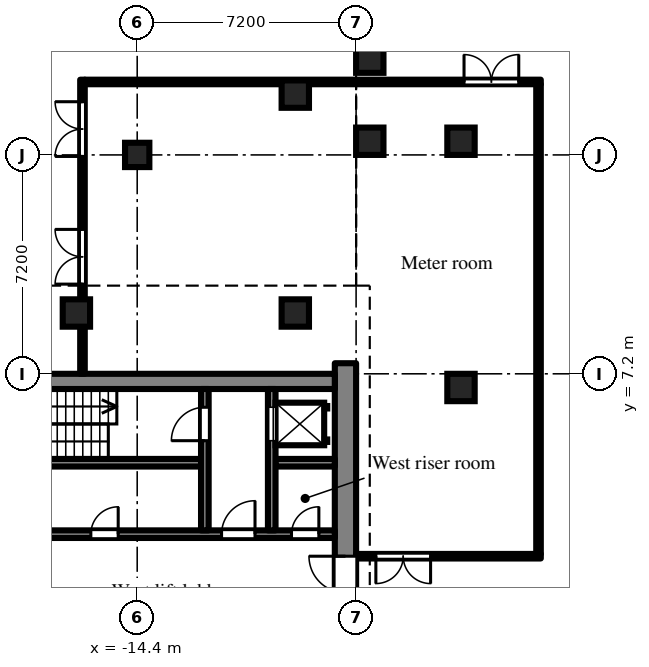
"""IFC4 building model, lengths in metres.
Left out: names, types, materials, properties, quantities, classifications, styles, units other than length and angle.
Written with IfcOpenShell. Run it as: python <this file> out.ifc"""

import sys

from ifc_helpers import new_model, si_unit, direction, frame, frame_2d, origin, origin_2d, place, context, subcontext, project, spatial, rectangle, extrude, element, fill, save


model = new_model("IFC4")
c1 = context("Model", 3, precision=1e-05, world=origin(), true_north=direction((0.0, 1.0)))
c2 = subcontext(c1, "Body", "Model", "MODEL_VIEW")
j1 = project(units=[si_unit("LENGTHUNIT", "METRE"), si_unit("PLANEANGLEUNIT", "RADIAN")], contexts=[c1])
p1 = place(None, origin())
s1 = spatial("IfcSite", under=j1, at=p1, CompositionType="ELEMENT")
p2 = place(p1, origin())
s2 = spatial("IfcBuilding", under=s1, at=p2, CompositionType="ELEMENT")
p3 = place(p2, frame((0.0, 0.0, -4.8)))
s3 = spatial("IfcBuildingStorey", under=s2, at=p3, CompositionType="ELEMENT", Elevation=-4.8)
for number, where, z_axis, x_axis in (
    (1, (-6.75, 14.85, -0.5), (0.0, 0.0, 1.0), (1.0, 0.0, 0.0)),
    (2, (-6.75, 17.55, -0.5), (0.0, 0.0, 1.0), (1.0, 0.0, 0.0)),
    (3, (-3.75, 6.75, -0.5), (0.0, 0.0, 1.0), (1.0, 0.0, 0.0)),
    (4, (-3.75, 14.85, -0.5), (0.0, 0.0, 1.0), (1.0, 0.0, 0.0)),
):
    element("IfcColumn", number, at=place(p3, frame(where, z_axis=z_axis, x_axis=x_axis)), inside=s3, PredefinedType="COLUMN", context=c2, shape_type="SweptSolid", body=[
        extrude(rectangle(XDim=0.9, YDim=0.9, at=origin_2d()), origin(), (0.0, 0.0, 1.0), 5.3),
    ])
p4 = place(p3, frame((-14.4, 14.4, -0.5), z_axis=(0.0, 0.0, 1.0), x_axis=(1.0, 0.0, 0.0)))
e5 = element("IfcColumn", 5, at=p4, inside=s3, PredefinedType="COLUMN", context=c2, shape_type="SweptSolid", body=[
    extrude(rectangle(XDim=0.8, YDim=0.8, at=origin_2d()), origin(), (0.0, 0.0, 1.0), 5.3),
])
for number, where, z_axis, x_axis in (
    (6, (-16.4, 9.2, -0.5), (0.0, 0.0, 1.0), (1.0, 0.0, 0.0)),
    (7, (-9.2, 9.2, -0.5), (0.0, 0.0, 1.0), (1.0, 0.0, 0.0)),
    (8, (-9.2, 16.4, -0.5), (0.0, 0.0, 1.0), (1.0, 0.0, 0.0)),
):
    element("IfcColumn", number, at=place(p3, frame(where, z_axis=z_axis, x_axis=x_axis)), inside=s3, PredefinedType="COLUMN", context=c2, shape_type="SweptSolid", body=[
        extrude(rectangle(XDim=0.9, YDim=0.9, at=origin_2d()), origin(), (0.0, 0.0, 1.0), 5.3),
    ])
p5 = place(p3, frame((-7.55, -7.548, 0.0), z_axis=(0.0, 0.0, 1.0), x_axis=(0.0, 1.0, 0.0)))
e9 = element("IfcWall", 9, at=p5, inside=s3, PredefinedType="SHEAR", context=c2, shape_type="SweptSolid", body=[
    extrude(rectangle(XDim=15.096, YDim=0.7, at=frame_2d((7.548, 0.0))), origin(), (0.0, 0.0, 1.0), 4.35),
])
p6 = place(p5, frame((6.348, 0.0, 0.0)))
e10 = element("IfcOpeningElement", 10, at=p6, cuts=e9, PredefinedType="OPENING", context=c2, shape_type="SweptSolid", body=[
    extrude(rectangle(XDim=2.4, YDim=2.2, at=frame_2d((1.2, 1.1))), frame((0.0, 0.36, 0.0), z_axis=(0.0, -1.0, 0.0), x_axis=(1.0, 0.0, 0.0)), (0.0, 0.0, 1.0), 0.72),
])
p7 = place(p3, frame((-7.9, 6.95, 0.0), z_axis=(0.0, 0.0, 1.0), x_axis=(-1.0, 0.0, 0.0)))
e11 = element("IfcWall", 11, at=p7, inside=s3, PredefinedType="SHEAR", context=c2, shape_type="SweptSolid", body=[
    extrude(rectangle(XDim=12.95, YDim=0.5, at=frame_2d((6.475, 0.0))), origin(), (0.0, 0.0, 1.0), 4.35),
])
p8 = place(p3, frame((-7.9, 1.925, 0.0), z_axis=(0.0, 0.0, 1.0), x_axis=(-1.0, 0.0, 0.0)))
e12 = element("IfcWall", 12, at=p8, inside=s3, PredefinedType="SHEAR", context=c2, shape_type="SweptSolid", body=[
    extrude(rectangle(XDim=12.95, YDim=0.25, at=frame_2d((6.475, 0.0))), origin(), (0.0, 0.0, 1.0), 4.35),
])
p9 = place(p8, frame((0.525, 0.0, 0.0)))
e13 = element("IfcOpeningElement", 13, at=p9, cuts=e12, PredefinedType="OPENING", context=c2, shape_type="SweptSolid", body=[
    extrude(rectangle(XDim=0.9, YDim=2.1, at=frame_2d((0.45, 1.05))), frame((0.0, 0.135, 0.0), z_axis=(0.0, -1.0, 0.0), x_axis=(1.0, 0.0, 0.0)), (0.0, 0.0, 1.0), 0.27),
])
p10 = place(p8, frame((2.625, 0.0, 0.0)))
e14 = element("IfcOpeningElement", 14, at=p10, cuts=e12, PredefinedType="OPENING", context=c2, shape_type="SweptSolid", body=[
    extrude(rectangle(XDim=1.1, YDim=2.1, at=frame_2d((0.55, 1.05))), frame((0.0, 0.135, 0.0), z_axis=(0.0, -1.0, 0.0), x_axis=(1.0, 0.0, 0.0)), (0.0, 0.0, 1.0), 0.27),
])
p11 = place(p8, frame((7.125, 0.0, 0.0)))
e15 = element("IfcOpeningElement", 15, at=p11, cuts=e12, PredefinedType="OPENING", context=c2, shape_type="SweptSolid", body=[
    extrude(rectangle(XDim=0.9, YDim=2.1, at=frame_2d((0.45, 1.05))), frame((0.0, 0.135, 0.0), z_axis=(0.0, -1.0, 0.0), x_axis=(1.0, 0.0, 0.0)), (0.0, 0.0, 1.0), 0.27),
])
p12 = place(p3, frame((-7.9, 4.275, 0.0), z_axis=(0.0, 0.0, 1.0), x_axis=(-1.0, 0.0, 0.0)))
e16 = element("IfcWall", 16, at=p12, inside=s3, PredefinedType="SHEAR", context=c2, shape_type="SweptSolid", body=[
    extrude(rectangle(XDim=1.95, YDim=0.25, at=frame_2d((0.975, 0.0))), origin(), (0.0, 0.0, 1.0), 4.35),
])
p13 = place(p3, frame((-12.3, 4.275, 0.0), z_axis=(0.0, 0.0, 1.0), x_axis=(-1.0, 0.0, 0.0)))
e17 = element("IfcWall", 17, at=p13, inside=s3, PredefinedType="SHEAR", context=c2, shape_type="SweptSolid", body=[
    extrude(rectangle(XDim=8.55, YDim=0.25, at=frame_2d((4.275, 0.0))), origin(), (0.0, 0.0, 1.0), 4.35),
])
p14 = place(p3, frame((-9.975, 2.05, 0.0), z_axis=(0.0, 0.0, 1.0), x_axis=(0.0, 1.0, 0.0)))
e18 = element("IfcWall", 18, at=p14, inside=s3, PredefinedType="SHEAR", context=c2, shape_type="SweptSolid", body=[
    extrude(rectangle(XDim=4.65, YDim=0.25, at=frame_2d((2.325, 0.0))), origin(), (0.0, 0.0, 1.0), 4.35),
])
p15 = place(p14, frame((2.95, 0.0, 0.0)))
e19 = element("IfcOpeningElement", 19, at=p15, cuts=e18, PredefinedType="OPENING", context=c2, shape_type="SweptSolid", body=[
    extrude(rectangle(XDim=1.1, YDim=2.1, at=frame_2d((0.55, 1.05))), frame((0.0, 0.135, 0.0), z_axis=(0.0, -1.0, 0.0), x_axis=(1.0, 0.0, 0.0)), (0.0, 0.0, 1.0), 0.27),
])
p16 = place(p3, frame((-12.175, 2.05, 0.0), z_axis=(0.0, 0.0, 1.0), x_axis=(0.0, 1.0, 0.0)))
e20 = element("IfcWall", 20, at=p16, inside=s3, PredefinedType="SHEAR", context=c2, shape_type="SweptSolid", body=[
    extrude(rectangle(XDim=4.65, YDim=0.25, at=frame_2d((2.325, 0.0))), origin(), (0.0, 0.0, 1.0), 4.35),
])
p17 = place(p16, frame((2.95, 0.0, 0.0)))
e21 = element("IfcOpeningElement", 21, at=p17, cuts=e20, PredefinedType="OPENING", context=c2, shape_type="SweptSolid", body=[
    extrude(rectangle(XDim=1.1, YDim=2.1, at=frame_2d((0.55, 1.05))), frame((0.0, 0.135, 0.0), z_axis=(0.0, -1.0, 0.0), x_axis=(1.0, 0.0, 0.0)), (0.0, 0.0, 1.0), 0.27),
])
p18 = place(p3, frame((-16.2, 7.2, 0.0), z_axis=(0.0, 0.0, 1.0), x_axis=(0.0, 1.0, 0.0)))
e22 = element("IfcWall", 22, at=p18, inside=s3, PredefinedType="PARTITIONING", context=c2, shape_type="SweptSolid", body=[
    extrude(rectangle(XDim=9.675, YDim=0.15, at=frame_2d((4.837, 0.0))), origin(), (0.0, 0.0, 1.0), 4.35),
])
p19 = place(p18, frame((2.95, 0.0, 0.0)))
e23 = element("IfcOpeningElement", 23, at=p19, cuts=e22, PredefinedType="OPENING", context=c2, shape_type="SweptSolid", body=[
    extrude(rectangle(XDim=1.8, YDim=2.1, at=frame_2d((0.9, 1.05))), frame((0.0, 0.085, 0.0), z_axis=(0.0, -1.0, 0.0), x_axis=(1.0, 0.0, 0.0)), (0.0, 0.0, 1.0), 0.17),
])
p20 = place(p18, frame((7.15, 0.0, 0.0)))
e24 = element("IfcOpeningElement", 24, at=p20, cuts=e22, PredefinedType="OPENING", context=c2, shape_type="SweptSolid", body=[
    extrude(rectangle(XDim=1.8, YDim=2.1, at=frame_2d((0.9, 1.05))), frame((0.0, 0.085, 0.0), z_axis=(0.0, -1.0, 0.0), x_axis=(1.0, 0.0, 0.0)), (0.0, 0.0, 1.0), 0.17),
])
p21 = place(p3, frame((-16.125, 16.8, 0.0), z_axis=(0.0, 0.0, 1.0), x_axis=(1.0, 0.0, 0.0)))
e25 = element("IfcWall", 25, at=p21, inside=s3, PredefinedType="PARTITIONING", context=c2, shape_type="SweptSolid", body=[
    extrude(rectangle(XDim=15.0, YDim=0.15, at=frame_2d((7.5, 0.0))), origin(), (0.0, 0.0, 1.0), 4.35),
])
p22 = place(p21, frame((12.475, 0.0, 0.0)))
e26 = element("IfcOpeningElement", 26, at=p22, cuts=e25, PredefinedType="OPENING", context=c2, shape_type="SweptSolid", body=[
    extrude(rectangle(XDim=1.8, YDim=2.1, at=frame_2d((0.9, 1.05))), frame((0.0, 0.085, 0.0), z_axis=(0.0, -1.0, 0.0), x_axis=(1.0, 0.0, 0.0)), (0.0, 0.0, 1.0), 0.17),
])
p23 = place(p3, frame((-7.2, 1.2, 0.0), z_axis=(0.0, 0.0, 1.0), x_axis=(1.0, 0.0, 0.0)))
e27 = element("IfcWall", 27, at=p23, inside=s3, PredefinedType="PARTITIONING", context=c2, shape_type="SweptSolid", body=[
    extrude(rectangle(XDim=6.075, YDim=0.15, at=frame_2d((3.038, 0.0))), origin(), (0.0, 0.0, 1.0), 4.35),
])
p24 = place(p23, frame((0.65, 0.0, 0.0)))
e28 = element("IfcOpeningElement", 28, at=p24, cuts=e27, PredefinedType="OPENING", context=c2, shape_type="SweptSolid", body=[
    extrude(rectangle(XDim=1.8, YDim=2.1, at=frame_2d((0.9, 1.05))), frame((0.0, 0.085, 0.0), z_axis=(0.0, -1.0, 0.0), x_axis=(1.0, 0.0, 0.0)), (0.0, 0.0, 1.0), 0.17),
])
p25 = place(p3, frame((-1.2, 1.275, 0.0), z_axis=(0.0, 0.0, 1.0), x_axis=(0.0, 1.0, 0.0)))
e29 = element("IfcWall", 29, at=p25, inside=s3, PredefinedType="PARTITIONING", context=c2, shape_type="SweptSolid", body=[
    extrude(rectangle(XDim=15.45, YDim=0.15, at=frame_2d((7.725, 0.0))), origin(), (0.0, 0.0, 1.0), 4.35),
])
p26 = place(p15, origin())
e30 = element("IfcDoor", 30, at=p26, inside=s3, OperationType="SLIDING_TO_LEFT", PredefinedType="DOOR", context=c2, shape_type="SweptSolid", body=[
    extrude(rectangle(XDim=1.1, YDim=2.1, at=frame_2d((0.55, 1.05))), frame((0.0, 0.025, 0.0), z_axis=(0.0, -1.0, 0.0), x_axis=(1.0, 0.0, 0.0)), (0.0, 0.0, 1.0), 0.05),
])
fill(e19, e30)
p27 = place(p17, origin())
e31 = element("IfcDoor", 31, at=p27, inside=s3, OperationType="SINGLE_SWING_LEFT", PredefinedType="DOOR", context=c2, shape_type="SweptSolid", body=[
    extrude(rectangle(XDim=1.1, YDim=2.1, at=frame_2d((0.55, 1.05))), frame((0.0, 0.025, 0.0), z_axis=(0.0, -1.0, 0.0), x_axis=(1.0, 0.0, 0.0)), (0.0, 0.0, 1.0), 0.05),
])
fill(e21, e31)
p28 = place(p9, frame((0.9, 0.0, 0.0), z_axis=(0.0, 0.0, 1.0), x_axis=(-1.0, 0.0, 0.0)))
e32 = element("IfcDoor", 32, at=p28, inside=s3, OperationType="SINGLE_SWING_RIGHT", PredefinedType="DOOR", context=c2, shape_type="SweptSolid", body=[
    extrude(rectangle(XDim=0.9, YDim=2.1, at=frame_2d((0.45, 1.05))), frame((0.0, 0.025, 0.0), z_axis=(0.0, -1.0, 0.0), x_axis=(1.0, 0.0, 0.0)), (0.0, 0.0, 1.0), 0.05),
])
fill(e13, e32)
p29 = place(p10, frame((1.1, 0.0, 0.0), z_axis=(0.0, 0.0, 1.0), x_axis=(-1.0, 0.0, 0.0)))
e33 = element("IfcDoor", 33, at=p29, inside=s3, OperationType="SINGLE_SWING_RIGHT", PredefinedType="DOOR", context=c2, shape_type="SweptSolid", body=[
    extrude(rectangle(XDim=1.1, YDim=2.1, at=frame_2d((0.55, 1.05))), frame((0.0, 0.025, 0.0), z_axis=(0.0, -1.0, 0.0), x_axis=(1.0, 0.0, 0.0)), (0.0, 0.0, 1.0), 0.05),
])
fill(e14, e33)
p30 = place(p6, origin())
e34 = element("IfcDoor", 34, at=p30, inside=s3, OperationType="DOUBLE_DOOR_DOUBLE_SWING", PredefinedType="DOOR", context=c2, shape_type="SweptSolid", body=[
    extrude(rectangle(XDim=2.4, YDim=2.2, at=frame_2d((1.2, 1.1))), frame((0.0, 0.025, 0.0), z_axis=(0.0, -1.0, 0.0), x_axis=(1.0, 0.0, 0.0)), (0.0, 0.0, 1.0), 0.05),
])
fill(e10, e34)
p31 = place(p11, frame((0.9, 0.0, 0.0), z_axis=(0.0, 0.0, 1.0), x_axis=(-1.0, 0.0, 0.0)))
e35 = element("IfcDoor", 35, at=p31, inside=s3, OperationType="SINGLE_SWING_RIGHT", PredefinedType="DOOR", context=c2, shape_type="SweptSolid", body=[
    extrude(rectangle(XDim=0.9, YDim=2.1, at=frame_2d((0.45, 1.05))), frame((0.0, 0.025, 0.0), z_axis=(0.0, -1.0, 0.0), x_axis=(1.0, 0.0, 0.0)), (0.0, 0.0, 1.0), 0.05),
])
fill(e15, e35)
p32 = place(p19, origin())
e36 = element("IfcDoor", 36, at=p32, inside=s3, OperationType="DOUBLE_DOOR_DOUBLE_SWING", PredefinedType="DOOR", context=c2, shape_type="SweptSolid", body=[
    extrude(rectangle(XDim=1.8, YDim=2.1, at=frame_2d((0.9, 1.05))), frame((0.0, 0.025, 0.0), z_axis=(0.0, -1.0, 0.0), x_axis=(1.0, 0.0, 0.0)), (0.0, 0.0, 1.0), 0.05),
])
fill(e23, e36)
p33 = place(p20, origin())
e37 = element("IfcDoor", 37, at=p33, inside=s3, OperationType="DOUBLE_DOOR_DOUBLE_SWING", PredefinedType="DOOR", context=c2, shape_type="SweptSolid", body=[
    extrude(rectangle(XDim=1.8, YDim=2.1, at=frame_2d((0.9, 1.05))), frame((0.0, 0.025, 0.0), z_axis=(0.0, -1.0, 0.0), x_axis=(1.0, 0.0, 0.0)), (0.0, 0.0, 1.0), 0.05),
])
fill(e24, e37)
p34 = place(p24, frame((1.8, 0.0, 0.0), z_axis=(0.0, 0.0, 1.0), x_axis=(-1.0, 0.0, 0.0)))
e38 = element("IfcDoor", 38, at=p34, inside=s3, OperationType="DOUBLE_DOOR_DOUBLE_SWING", PredefinedType="DOOR", context=c2, shape_type="SweptSolid", body=[
    extrude(rectangle(XDim=1.8, YDim=2.1, at=frame_2d((0.9, 1.05))), frame((0.0, 0.025, 0.0), z_axis=(0.0, -1.0, 0.0), x_axis=(1.0, 0.0, 0.0)), (0.0, 0.0, 1.0), 0.05),
])
fill(e28, e38)
p35 = place(p22, origin())
e39 = element("IfcDoor", 39, at=p35, inside=s3, OperationType="DOUBLE_DOOR_DOUBLE_SWING", PredefinedType="DOOR", context=c2, shape_type="SweptSolid", body=[
    extrude(rectangle(XDim=1.8, YDim=2.1, at=frame_2d((0.9, 1.05))), frame((0.0, 0.025, 0.0), z_axis=(0.0, -1.0, 0.0), x_axis=(1.0, 0.0, 0.0)), (0.0, 0.0, 1.0), 0.05),
])
fill(e26, e39)
save(model, sys.argv[1])
